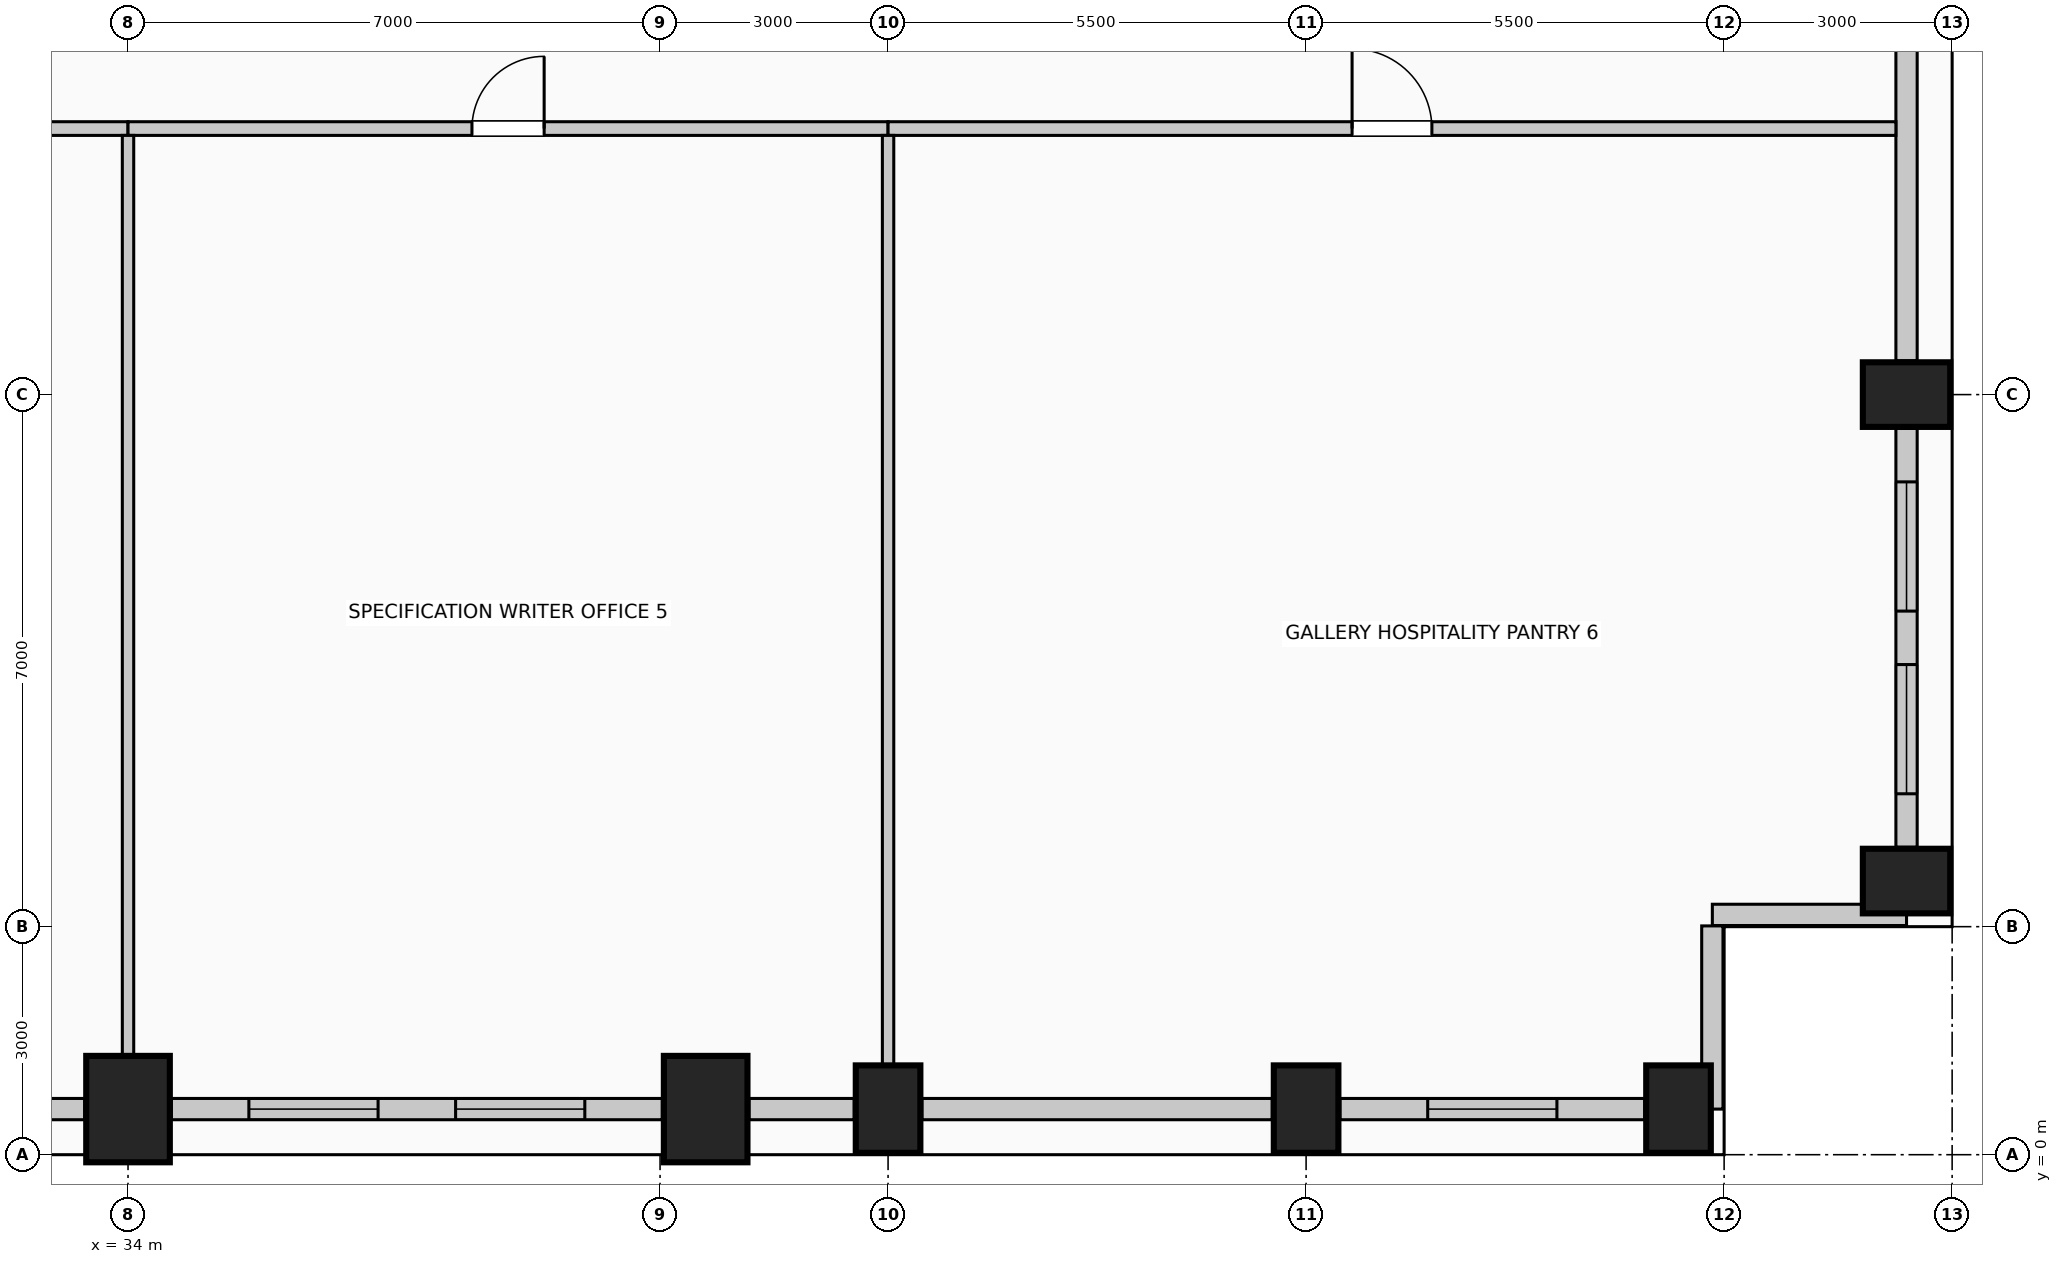
"""IFC4 building model, lengths in metres.
Left out: names, types, materials, properties, quantities, classifications, styles, units other than length and angle.
Written with IfcOpenShell. Run it as: python <this file> out.ifc"""

import sys

from ifc_helpers import new_model, si_unit, direction, frame, frame_2d, origin, origin_2d, place, context, subcontext, project, spatial, rectangle, extrude, element, fill, save


model = new_model("IFC4")
c1 = context("Model", 3, precision=1e-05, world=origin(), true_north=direction((0.0, 1.0)))
c2 = subcontext(c1, "Body", "Model", "MODEL_VIEW")
j1 = project(units=[si_unit("LENGTHUNIT", "METRE"), si_unit("PLANEANGLEUNIT", "RADIAN")], contexts=[c1])
p1 = place(None, origin())
s1 = spatial("IfcSite", under=j1, at=p1, CompositionType="ELEMENT")
p2 = place(p1, origin())
s2 = spatial("IfcBuilding", under=s1, at=p2, CompositionType="ELEMENT")
p3 = place(p2, frame((0.0, 0.0, 136.6)))
s3 = spatial("IfcBuildingStorey", under=s2, at=p3, CompositionType="ELEMENT", Elevation=136.6)
for number, where, z_axis, x_axis in (
    (1, (34.0, 0.6, 0.0), (0.0, 0.0, 1.0), (1.0, 0.0, 0.0)),
    (2, (41.6, 0.6, 0.0), (0.0, 0.0, 1.0), (1.0, 0.0, 0.0)),
):
    element("IfcColumn", number, at=place(p3, frame(where, z_axis=z_axis, x_axis=x_axis)), inside=s3, PredefinedType="COLUMN", context=c2, shape_type="SweptSolid", body=[
        extrude(rectangle(XDim=1.1, YDim=1.4, at=origin_2d()), origin(), (0.0, 0.0, 1.0), 4.0),
    ])
for number, where, z_axis, x_axis in (
    (3, (44.0, 0.6, 0.0), (0.0, 0.0, 1.0), (1.0, 0.0, 0.0)),
    (4, (49.5, 0.6, 0.0), (0.0, 0.0, 1.0), (1.0, 0.0, 0.0)),
    (5, (54.4, 0.6, 0.0), (0.0, 0.0, 1.0), (1.0, 0.0, 0.0)),
    (6, (57.4, 3.6, 0.0), (0.0, 0.0, 1.0), (0.0, 1.0, 0.0)),
    (7, (57.4, 10.0, 0.0), (0.0, 0.0, 1.0), (0.0, 1.0, 0.0)),
):
    element("IfcColumn", number, at=place(p3, frame(where, z_axis=z_axis, x_axis=x_axis)), inside=s3, PredefinedType="COLUMN", context=c2, shape_type="SweptSolid", body=[
        extrude(rectangle(XDim=0.85, YDim=1.15, at=origin_2d()), origin(), (0.0, 0.0, 1.0), 4.0),
    ])
p4 = place(p3, frame((33.43, 0.6, 0.0), z_axis=(0.0, 0.0, 1.0), x_axis=(-1.0, 0.0, 0.0)))
e8 = element("IfcWall", 8, at=p4, inside=s3, PredefinedType="SOLIDWALL", context=c2, shape_type="SweptSolid", body=[
    extrude(rectangle(XDim=3.985, YDim=0.28, at=frame_2d((1.992, 0.0))), origin(), (0.0, 0.0, 1.0), 2.875),
])
p5 = place(p4, frame((1.143, 0.0, 0.5)))
e9 = element("IfcOpeningElement", 9, at=p5, cuts=e8, PredefinedType="OPENING", context=c2, shape_type="SweptSolid", body=[
    extrude(rectangle(XDim=1.7, YDim=1.95, at=frame_2d((0.85, 0.975))), frame((0.0, 0.15, 0.0), z_axis=(0.0, -1.0, 0.0), x_axis=(1.0, 0.0, 0.0)), (0.0, 0.0, 1.0), 0.3),
])
p6 = place(p3, frame((41.03, 0.6, 0.0), z_axis=(0.0, 0.0, 1.0), x_axis=(-1.0, 0.0, 0.0)))
e10 = element("IfcWall", 10, at=p6, inside=s3, PredefinedType="SOLIDWALL", context=c2, shape_type="SweptSolid", body=[
    extrude(rectangle(XDim=6.46, YDim=0.28, at=frame_2d((3.23, 0.0))), origin(), (0.0, 0.0, 1.0), 2.875),
])
p7 = place(p6, frame((1.02, 0.0, 0.5)))
e11 = element("IfcOpeningElement", 11, at=p7, cuts=e10, PredefinedType="OPENING", context=c2, shape_type="SweptSolid", body=[
    extrude(rectangle(XDim=1.7, YDim=1.95, at=frame_2d((0.85, 0.975))), frame((0.0, 0.15, 0.0), z_axis=(0.0, -1.0, 0.0), x_axis=(1.0, 0.0, 0.0)), (0.0, 0.0, 1.0), 0.3),
])
p8 = place(p6, frame((3.74, 0.0, 0.5)))
e12 = element("IfcOpeningElement", 12, at=p8, cuts=e10, PredefinedType="OPENING", context=c2, shape_type="SweptSolid", body=[
    extrude(rectangle(XDim=1.7, YDim=1.95, at=frame_2d((0.85, 0.975))), frame((0.0, 0.15, 0.0), z_axis=(0.0, -1.0, 0.0), x_axis=(1.0, 0.0, 0.0)), (0.0, 0.0, 1.0), 0.3),
])
p9 = place(p3, frame((43.555, 0.6, 0.0), z_axis=(0.0, 0.0, 1.0), x_axis=(-1.0, 0.0, 0.0)))
e13 = element("IfcWall", 13, at=p9, inside=s3, PredefinedType="SOLIDWALL", context=c2, shape_type="SweptSolid", body=[
    extrude(rectangle(XDim=1.385, YDim=0.28, at=frame_2d((0.692, 0.0))), origin(), (0.0, 0.0, 1.0), 2.875),
])
p10 = place(p3, frame((49.055, 0.6, 0.0), z_axis=(0.0, 0.0, 1.0), x_axis=(-1.0, 0.0, 0.0)))
e14 = element("IfcWall", 14, at=p10, inside=s3, PredefinedType="SOLIDWALL", context=c2, shape_type="SweptSolid", body=[
    extrude(rectangle(XDim=4.61, YDim=0.28, at=frame_2d((2.305, 0.0))), origin(), (0.0, 0.0, 1.0), 2.875),
])
p11 = place(p3, frame((53.955, 0.6, 0.0), z_axis=(0.0, 0.0, 1.0), x_axis=(-1.0, 0.0, 0.0)))
e15 = element("IfcWall", 15, at=p11, inside=s3, PredefinedType="SOLIDWALL", context=c2, shape_type="SweptSolid", body=[
    extrude(rectangle(XDim=4.01, YDim=0.28, at=frame_2d((2.005, 0.0))), origin(), (0.0, 0.0, 1.0), 2.875),
])
p12 = place(p11, frame((1.155, 0.0, 0.5)))
e16 = element("IfcOpeningElement", 16, at=p12, cuts=e15, PredefinedType="OPENING", context=c2, shape_type="SweptSolid", body=[
    extrude(rectangle(XDim=1.7, YDim=1.95, at=frame_2d((0.85, 0.975))), frame((0.0, 0.15, 0.0), z_axis=(0.0, -1.0, 0.0), x_axis=(1.0, 0.0, 0.0)), (0.0, 0.0, 1.0), 0.3),
])
p13 = place(p3, frame((57.4, 9.555, 0.0), z_axis=(0.0, 0.0, 1.0), x_axis=(0.0, -1.0, 0.0)))
e17 = element("IfcWall", 17, at=p13, inside=s3, PredefinedType="SOLIDWALL", context=c2, shape_type="SweptSolid", body=[
    extrude(rectangle(XDim=5.51, YDim=0.28, at=frame_2d((2.755, 0.0))), origin(), (0.0, 0.0, 1.0), 2.875),
])
p14 = place(p13, frame((0.703, 0.0, 0.5)))
e18 = element("IfcOpeningElement", 18, at=p14, cuts=e17, PredefinedType="OPENING", context=c2, shape_type="SweptSolid", body=[
    extrude(rectangle(XDim=1.7, YDim=1.95, at=frame_2d((0.85, 0.975))), frame((0.0, 0.15, 0.0), z_axis=(0.0, -1.0, 0.0), x_axis=(1.0, 0.0, 0.0)), (0.0, 0.0, 1.0), 0.3),
])
p15 = place(p13, frame((3.107, 0.0, 0.5)))
e19 = element("IfcOpeningElement", 19, at=p15, cuts=e17, PredefinedType="OPENING", context=c2, shape_type="SweptSolid", body=[
    extrude(rectangle(XDim=1.7, YDim=1.95, at=frame_2d((0.85, 0.975))), frame((0.0, 0.15, 0.0), z_axis=(0.0, -1.0, 0.0), x_axis=(1.0, 0.0, 0.0)), (0.0, 0.0, 1.0), 0.3),
])
p16 = place(p3, frame((57.4, 17.555, 0.0), z_axis=(0.0, 0.0, 1.0), x_axis=(0.0, -1.0, 0.0)))
e20 = element("IfcWall", 20, at=p16, inside=s3, PredefinedType="SOLIDWALL", context=c2, shape_type="SweptSolid", body=[
    extrude(rectangle(XDim=7.11, YDim=0.28, at=frame_2d((3.555, 0.0))), origin(), (0.0, 0.0, 1.0), 2.875),
])
p17 = place(p3, frame((57.4, 3.155, 0.0), z_axis=(0.0, 0.0, 1.0), x_axis=(-1.0, 0.0, 0.0)))
e21 = element("IfcWall", 21, at=p17, inside=s3, PredefinedType="SOLIDWALL", context=c2, shape_type="SweptSolid", body=[
    extrude(rectangle(XDim=2.555, YDim=0.28, at=frame_2d((1.277, 0.0))), origin(), (0.0, 0.0, 1.0), 3.725),
])
p18 = place(p3, frame((54.845, 3.01, 0.0), z_axis=(0.0, 0.0, 1.0), x_axis=(0.0, -1.0, 0.0)))
e22 = element("IfcWall", 22, at=p18, inside=s3, PredefinedType="SOLIDWALL", context=c2, shape_type="SweptSolid", body=[
    extrude(rectangle(XDim=2.41, YDim=0.28, at=frame_2d((1.205, 0.0))), origin(), (0.0, 0.0, 1.0), 3.725),
])
p19 = place(p3, frame((24.0, 13.5, 0.0), z_axis=(0.0, 0.0, 1.0), x_axis=(1.0, 0.0, 0.0)))
e23 = element("IfcWall", 23, at=p19, inside=s3, PredefinedType="PARTITIONING", context=c2, shape_type="SweptSolid", body=[
    extrude(rectangle(XDim=10.0, YDim=0.18, at=frame_2d((5.0, 0.0))), origin(), (0.0, 0.0, 1.0), 3.725),
])
p20 = place(p19, frame((4.475, 0.0, 0.0)))
e24 = element("IfcOpeningElement", 24, at=p20, cuts=e23, PredefinedType="OPENING", context=c2, shape_type="SweptSolid", body=[
    extrude(rectangle(XDim=1.05, YDim=2.15, at=frame_2d((0.525, 1.075))), frame((0.0, 0.1, 0.0), z_axis=(0.0, -1.0, 0.0), x_axis=(1.0, 0.0, 0.0)), (0.0, 0.0, 1.0), 0.2),
])
p21 = place(p3, frame((34.0, 13.5, 0.0), z_axis=(0.0, 0.0, 1.0), x_axis=(1.0, 0.0, 0.0)))
e25 = element("IfcWall", 25, at=p21, inside=s3, PredefinedType="PARTITIONING", context=c2, shape_type="SweptSolid", body=[
    extrude(rectangle(XDim=10.0, YDim=0.18, at=frame_2d((5.0, 0.0))), origin(), (0.0, 0.0, 1.0), 3.725),
])
p22 = place(p21, frame((4.525, 0.0, 0.0)))
e26 = element("IfcOpeningElement", 26, at=p22, cuts=e25, PredefinedType="OPENING", context=c2, shape_type="SweptSolid", body=[
    extrude(rectangle(XDim=0.95, YDim=2.15, at=frame_2d((0.475, 1.075))), frame((0.0, 0.1, 0.0), z_axis=(0.0, -1.0, 0.0), x_axis=(1.0, 0.0, 0.0)), (0.0, 0.0, 1.0), 0.2),
])
p23 = place(p3, frame((44.0, 13.5, 0.0), z_axis=(0.0, 0.0, 1.0), x_axis=(1.0, 0.0, 0.0)))
e27 = element("IfcWall", 27, at=p23, inside=s3, PredefinedType="PARTITIONING", context=c2, shape_type="SweptSolid", body=[
    extrude(rectangle(XDim=13.26, YDim=0.18, at=frame_2d((6.63, 0.0))), origin(), (0.0, 0.0, 1.0), 3.725),
])
p24 = place(p23, frame((6.105, 0.0, 0.0)))
e28 = element("IfcOpeningElement", 28, at=p24, cuts=e27, PredefinedType="OPENING", context=c2, shape_type="SweptSolid", body=[
    extrude(rectangle(XDim=1.05, YDim=2.15, at=frame_2d((0.525, 1.075))), frame((0.0, 0.1, 0.0), z_axis=(0.0, -1.0, 0.0), x_axis=(1.0, 0.0, 0.0)), (0.0, 0.0, 1.0), 0.2),
])
p25 = place(p3, frame((34.0, 1.3, 0.0), z_axis=(0.0, 0.0, 1.0), x_axis=(0.0, 1.0, 0.0)))
e29 = element("IfcWall", 29, at=p25, inside=s3, PredefinedType="PARTITIONING", context=c2, shape_type="SweptSolid", body=[
    extrude(rectangle(XDim=12.11, YDim=0.15, at=frame_2d((6.055, 0.0))), origin(), (0.0, 0.0, 1.0), 3.725),
])
p26 = place(p3, frame((44.0, 1.175, 0.0), z_axis=(0.0, 0.0, 1.0), x_axis=(0.0, 1.0, 0.0)))
e30 = element("IfcWall", 30, at=p26, inside=s3, PredefinedType="PARTITIONING", context=c2, shape_type="SweptSolid", body=[
    extrude(rectangle(XDim=12.235, YDim=0.15, at=frame_2d((6.117, 0.0))), origin(), (0.0, 0.0, 1.0), 3.725),
])
p27 = place(p7, origin())
e31 = element("IfcWindow", 31, at=p27, inside=s3, PartitioningType="SINGLE_PANEL", PredefinedType="WINDOW", context=c2, shape_type="SweptSolid", body=[
    extrude(rectangle(XDim=1.7, YDim=1.95, at=frame_2d((0.85, 0.975))), frame((0.0, 0.03, 0.0), z_axis=(0.0, -1.0, 0.0), x_axis=(1.0, 0.0, 0.0)), (0.0, 0.0, 1.0), 0.06),
])
fill(e11, e31)
p28 = place(p8, origin())
e32 = element("IfcWindow", 32, at=p28, inside=s3, PartitioningType="SINGLE_PANEL", PredefinedType="WINDOW", context=c2, shape_type="SweptSolid", body=[
    extrude(rectangle(XDim=1.7, YDim=1.95, at=frame_2d((0.85, 0.975))), frame((0.0, 0.03, 0.0), z_axis=(0.0, -1.0, 0.0), x_axis=(1.0, 0.0, 0.0)), (0.0, 0.0, 1.0), 0.06),
])
fill(e12, e32)
p29 = place(p12, origin())
e33 = element("IfcWindow", 33, at=p29, inside=s3, PartitioningType="SINGLE_PANEL", PredefinedType="WINDOW", context=c2, shape_type="SweptSolid", body=[
    extrude(rectangle(XDim=1.7, YDim=1.95, at=frame_2d((0.85, 0.975))), frame((0.0, 0.03, 0.0), z_axis=(0.0, -1.0, 0.0), x_axis=(1.0, 0.0, 0.0)), (0.0, 0.0, 1.0), 0.06),
])
fill(e16, e33)
p30 = place(p14, origin())
e34 = element("IfcWindow", 34, at=p30, inside=s3, PartitioningType="SINGLE_PANEL", PredefinedType="WINDOW", context=c2, shape_type="SweptSolid", body=[
    extrude(rectangle(XDim=1.7, YDim=1.95, at=frame_2d((0.85, 0.975))), frame((0.0, 0.03, 0.0), z_axis=(0.0, -1.0, 0.0), x_axis=(1.0, 0.0, 0.0)), (0.0, 0.0, 1.0), 0.06),
])
fill(e18, e34)
p31 = place(p15, origin())
e35 = element("IfcWindow", 35, at=p31, inside=s3, PartitioningType="SINGLE_PANEL", PredefinedType="WINDOW", context=c2, shape_type="SweptSolid", body=[
    extrude(rectangle(XDim=1.7, YDim=1.95, at=frame_2d((0.85, 0.975))), frame((0.0, 0.03, 0.0), z_axis=(0.0, -1.0, 0.0), x_axis=(1.0, 0.0, 0.0)), (0.0, 0.0, 1.0), 0.06),
])
fill(e19, e35)
p32 = place(p22, origin())
e36 = element("IfcDoor", 36, at=p32, inside=s3, OperationType="SINGLE_SWING_RIGHT", PredefinedType="DOOR", context=c2, shape_type="SweptSolid", body=[
    extrude(rectangle(XDim=0.95, YDim=2.15, at=frame_2d((0.475, 1.075))), frame((0.0, 0.025, 0.0), z_axis=(0.0, -1.0, 0.0), x_axis=(1.0, 0.0, 0.0)), (0.0, 0.0, 1.0), 0.05),
])
fill(e26, e36)
p33 = place(p24, origin())
e37 = element("IfcDoor", 37, at=p33, inside=s3, OperationType="SINGLE_SWING_LEFT", PredefinedType="DOOR", context=c2, shape_type="SweptSolid", body=[
    extrude(rectangle(XDim=1.05, YDim=2.15, at=frame_2d((0.525, 1.075))), frame((0.0, 0.025, 0.0), z_axis=(0.0, -1.0, 0.0), x_axis=(1.0, 0.0, 0.0)), (0.0, 0.0, 1.0), 0.05),
])
fill(e28, e37)
save(model, sys.argv[1])
